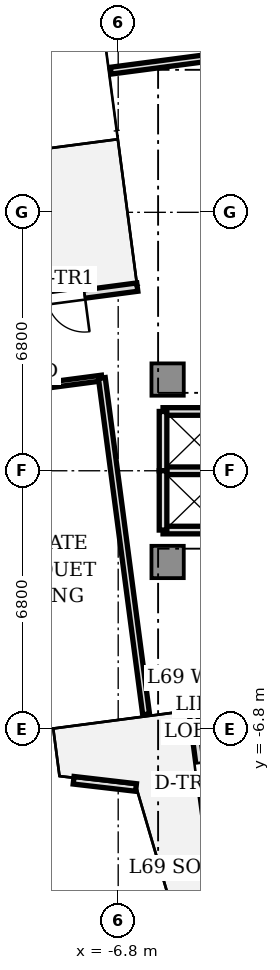
"""IFC4 building model, lengths in metres.
Left out: names, types, materials, properties, quantities, classifications, styles, units other than length and angle.
Written with IfcOpenShell. Run it as: python <this file> out.ifc"""

import sys

from ifc_helpers import new_model, si_unit, direction, frame, frame_2d, origin, origin_2d, place, context, subcontext, project, spatial, rectangle, extrude, source, transform, mapped, element, fill, save


model = new_model("IFC4")
c1 = context("Model", 3, precision=1e-05, world=origin(), true_north=direction((0.0, 1.0)))
c2 = subcontext(c1, "Body", "Model", "MODEL_VIEW")
j1 = project(units=[si_unit("LENGTHUNIT", "METRE"), si_unit("PLANEANGLEUNIT", "RADIAN")], contexts=[c1])
p1 = place(None, origin())
s1 = spatial("IfcSite", under=j1, at=p1, CompositionType="ELEMENT")
p2 = place(p1, origin())
s2 = spatial("IfcBuilding", under=s1, at=p2, CompositionType="ELEMENT")
p3 = place(p2, frame((0.0, 0.0, 247.85)))
s3 = spatial("IfcBuildingStorey", under=s2, at=p3, CompositionType="ELEMENT", Elevation=247.85)
m1 = source(origin(), c2, "Body", "SweptSolid", [
    extrude(rectangle(XDim=0.85, YDim=0.85, at=origin_2d()), origin(), (0.0, 0.0, 1.0), 3.11),
])
for number, where, z_axis, x_axis in (
    (1, (-5.5, 2.4, 0.0), (0.0, 0.0, 1.0), (1.0, 0.0, 0.0)),
    (2, (-5.5, -2.4, 0.0), (0.0, 0.0, 1.0), (1.0, 0.0, 0.0)),
):
    element("IfcColumn", number, at=place(p3, frame(where, z_axis=z_axis, x_axis=x_axis)), inside=s3, PredefinedType="COLUMN", context=c2, shape_type="MappedRepresentation", body=[
        mapped(m1, transform((0.0, 0.0, 0.0), scale=1.0)),
    ])
p4 = place(p3, frame((-6.298, 4.832, 0.0), z_axis=(0.0, 0.0, 1.0), x_axis=(-0.991451525486, -0.130475563272, 0.0)))
e3 = element("IfcWall", 3, at=p4, inside=s3, PredefinedType="STANDARD", context=c2, shape_type="SweptSolid", body=[
    extrude(rectangle(XDim=2.7, YDim=0.22, at=frame_2d((1.35, 0.0))), origin(), (0.0, 0.0, 1.0), 3.11),
])
p5 = place(p4, frame((1.4, 0.0, 0.0)))
e4 = element("IfcOpeningElement", 4, at=p5, cuts=e3, PredefinedType="OPENING", context=c2, shape_type="SweptSolid", body=[
    extrude(rectangle(XDim=1.0, YDim=2.2, at=frame_2d((0.5, 1.1))), frame((0.0, 0.12, 0.0), z_axis=(0.0, -1.0, 0.0), x_axis=(1.0, 0.0, 0.0)), (0.0, 0.0, 1.0), 0.24),
])
p6 = place(p3, frame((-4.832, -6.298, 0.0), z_axis=(0.0, 0.0, 1.0), x_axis=(0.130475563272, -0.991451525486, 0.0)))
e5 = element("IfcWall", 5, at=p6, inside=s3, PredefinedType="STANDARD", context=c2, shape_type="SweptSolid", body=[
    extrude(rectangle(XDim=2.7, YDim=0.22, at=frame_2d((1.35, 0.0))), origin(), (0.0, 0.0, 1.0), 3.11),
])
p7 = place(p6, frame((1.4, 0.0, 0.0)))
e6 = element("IfcOpeningElement", 6, at=p7, cuts=e5, PredefinedType="OPENING", context=c2, shape_type="SweptSolid", body=[
    extrude(rectangle(XDim=1.0, YDim=2.2, at=frame_2d((0.5, 1.1))), frame((0.0, 0.12, 0.0), z_axis=(0.0, -1.0, 0.0), x_axis=(1.0, 0.0, 0.0)), (0.0, 0.0, 1.0), 0.24),
])
p8 = place(p3, frame((-7.973, -8.144, 0.0), z_axis=(0.0, 0.0, 1.0), x_axis=(0.993336913932, -0.115246585284, 0.0)))
e7 = element("IfcWall", 7, at=p8, inside=s3, PredefinedType="PARAPET", context=c2, shape_type="SweptSolid", body=[
    extrude(rectangle(XDim=1.652, YDim=0.2, at=frame_2d((0.826, 0.0))), origin(), (0.0, 0.0, 1.0), 0.65),
])
for number, where, z_axis, x_axis in (
    (8, (-5.62, 1.56, 0.0), (0.0, 0.0, 1.0), (1.0, 0.0, 0.0)),
    (9, (-5.62, -1.56, 0.0), (0.0, 0.0, 1.0), (1.0, 0.0, 0.0)),
    (10, (-5.62, 0.0, 0.0), (0.0, 0.0, 1.0), (1.0, 0.0, 0.0)),
):
    element("IfcWall", number, at=place(p3, frame(where, z_axis=z_axis, x_axis=x_axis)), inside=s3, PredefinedType="SOLIDWALL", context=c2, shape_type="SweptSolid", body=[
        extrude(rectangle(XDim=1.64, YDim=0.2, at=frame_2d((0.82, 0.0))), origin(), (0.0, 0.0, 1.0), 2.66),
    ])
for number, where, z_axis, x_axis in (
    (11, (-5.62, 0.0, 0.0), (0.0, 0.0, 1.0), (0.0, 1.0, 0.0)),
    (12, (-5.62, -1.56, 0.0), (0.0, 0.0, 1.0), (0.0, 1.0, 0.0)),
):
    element("IfcWall", number, at=place(p3, frame(where, z_axis=z_axis, x_axis=x_axis)), inside=s3, PredefinedType="SOLIDWALL", context=c2, shape_type="SweptSolid", body=[
        extrude(rectangle(XDim=1.56, YDim=0.2, at=frame_2d((0.78, 0.0))), origin(), (0.0, 0.0, 1.0), 2.66),
    ])
p9 = place(p3, frame((-2.423, 11.129, 0.0), z_axis=(0.0, 0.0, 1.0), x_axis=(-0.991446547774, -0.130513382096, 0.0)))
e13 = element("IfcWall", 13, at=p9, inside=s3, PredefinedType="PARTITIONING", context=c2, shape_type="SweptSolid", body=[
    extrude(rectangle(XDim=4.613, YDim=0.18, at=frame_2d((2.307, 0.0))), origin(), (0.0, 0.0, 1.0), 2.66),
])
p10 = place(p3, frame((-7.23, 2.44, 0.0), z_axis=(0.0, 0.0, 1.0), x_axis=(-0.991442619765, -0.130543217797, 0.0)))
e14 = element("IfcWall", 14, at=p10, inside=s3, PredefinedType="PARTITIONING", context=c2, shape_type="SweptSolid", body=[
    extrude(rectangle(XDim=8.33, YDim=0.15, at=frame_2d((4.165, 0.0))), origin(), (0.0, 0.0, 1.0), 2.66),
])
p11 = place(p10, frame((1.691, 0.0, 0.0)))
e15 = element("IfcOpeningElement", 15, at=p11, cuts=e14, PredefinedType="OPENING", context=c2, shape_type="SweptSolid", body=[
    extrude(rectangle(XDim=0.85, YDim=2.1, at=frame_2d((0.425, 1.05))), frame((0.0, 0.085, 0.0), z_axis=(0.0, -1.0, 0.0), x_axis=(1.0, 0.0, 0.0)), (0.0, 0.0, 1.0), 0.17),
])
p12 = place(p10, frame((5.856, 0.0, 0.0)))
e16 = element("IfcOpeningElement", 16, at=p12, cuts=e14, PredefinedType="OPENING", context=c2, shape_type="SweptSolid", body=[
    extrude(rectangle(XDim=0.85, YDim=2.1, at=frame_2d((0.425, 1.05))), frame((0.0, 0.085, 0.0), z_axis=(0.0, -1.0, 0.0), x_axis=(1.0, 0.0, 0.0)), (0.0, 0.0, 1.0), 0.17),
])
p13 = place(p3, frame((-7.23, 2.44, 0.0), z_axis=(0.0, 0.0, 1.0), x_axis=(0.130549321022, -0.991441816135, 0.0)))
e17 = element("IfcWall", 17, at=p13, inside=s3, PredefinedType="PARTITIONING", context=c2, shape_type="SweptSolid", body=[
    extrude(rectangle(XDim=8.926, YDim=0.18, at=frame_2d((4.463, 0.0))), origin(), (0.0, 0.0, 1.0), 2.66),
])
m2 = source(origin(), c2, "Body", "SweptSolid", [
    extrude(rectangle(XDim=1.0, YDim=0.05, at=origin_2d()), origin(), (0.0, 0.0, 1.0), 2.2),
])
p14 = place(p5, frame((0.5, 0.0, 0.0)))
e18 = element("IfcDoor", 18, at=p14, inside=s3, OperationType="SINGLE_SWING_LEFT", PredefinedType="DOOR", context=c2, shape_type="MappedRepresentation", body=[
    mapped(m2, transform((0.0, 0.0, 0.0), scale=1.0)),
])
fill(e4, e18)
p15 = place(p7, frame((0.5, 0.0, 0.0)))
e19 = element("IfcDoor", 19, at=p15, inside=s3, OperationType="SINGLE_SWING_LEFT", PredefinedType="DOOR", context=c2, shape_type="MappedRepresentation", body=[
    mapped(m2, transform((0.0, 0.0, 0.0), scale=1.0)),
])
fill(e6, e19)
save(model, sys.argv[1])
